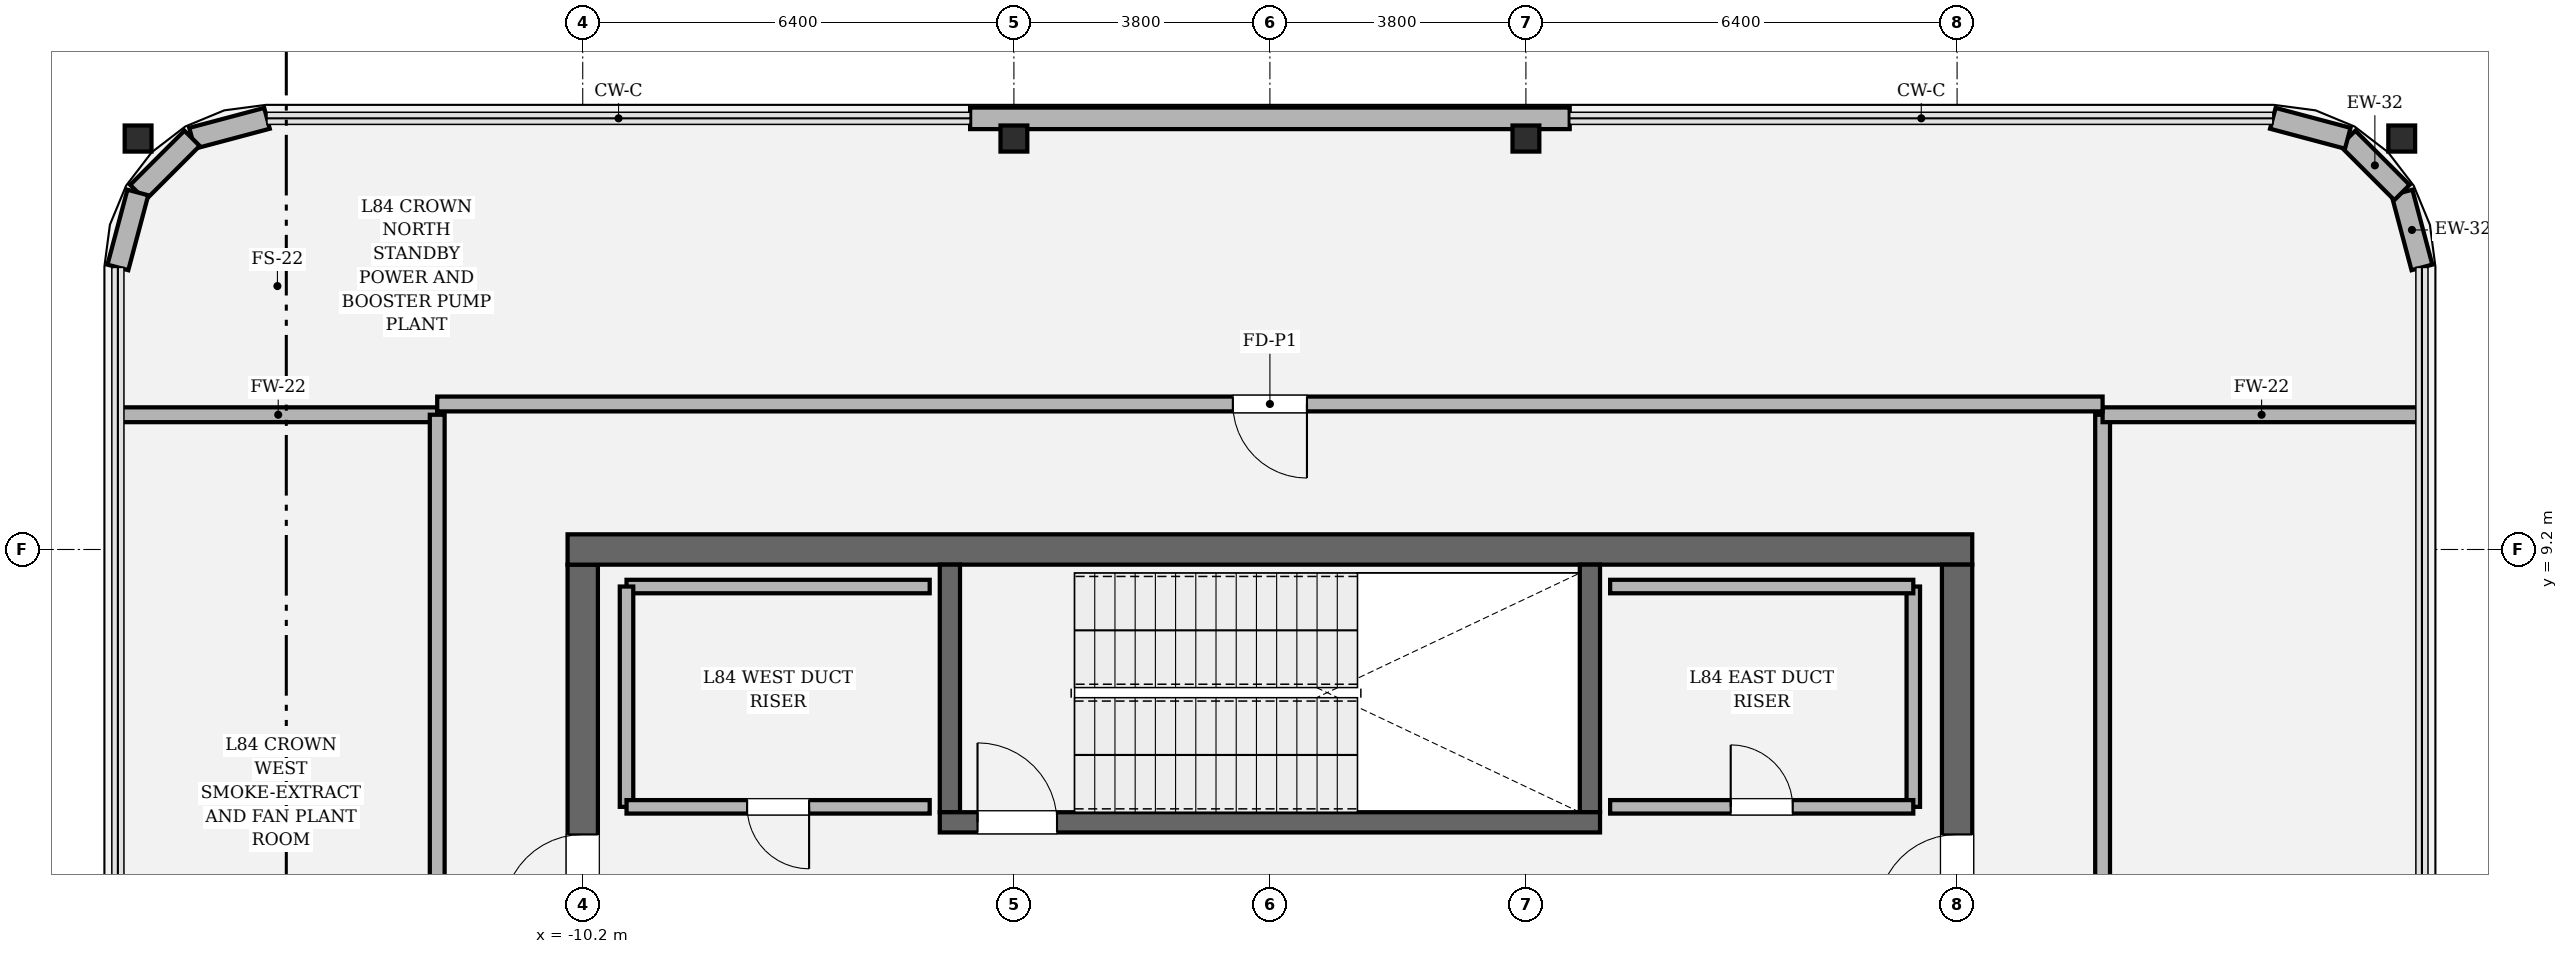
"""IFC4 building model, lengths in metres.
Left out: names, types, materials, properties, quantities, classifications, styles, units other than length and angle.
Written with IfcOpenShell. Run it as: python <this file> out.ifc"""

import sys

from ifc_helpers import new_model, si_unit, direction, frame, frame_2d, origin, origin_2d, place, context, subcontext, project, spatial, rectangle, i_section, extrude, element, fill, save


model = new_model("IFC4")
c1 = context("Model", 3, precision=1e-05, world=origin(), true_north=direction((0.0, 1.0)))
c2 = subcontext(c1, "Body", "Model", "MODEL_VIEW")
j1 = project(units=[si_unit("LENGTHUNIT", "METRE"), si_unit("PLANEANGLEUNIT", "RADIAN")], contexts=[c1])
p1 = place(None, origin())
s1 = spatial("IfcSite", under=j1, at=p1, CompositionType="ELEMENT")
p2 = place(p1, origin())
s2 = spatial("IfcBuilding", under=s1, at=p2, CompositionType="ELEMENT")
p3 = place(p2, frame((0.0, 0.0, 357.3)))
s3 = spatial("IfcBuildingStorey", under=s2, at=p3, CompositionType="ELEMENT", Elevation=357.3)
p4 = place(p3, frame((-10.2, -8.975, 0.0), z_axis=(0.0, 0.0, 1.0), x_axis=(0.0, 1.0, 0.0)))
e1 = element("IfcWall", 1, at=p4, inside=s3, PredefinedType="SHEAR", context=c2, shape_type="SweptSolid", body=[
    extrude(rectangle(XDim=17.95, YDim=0.45, at=frame_2d((8.975, 0.0))), origin(), (0.0, 0.0, 1.0), 4.5),
])
p5 = place(p4, frame((12.765, 0.0, 0.0)))
e2 = element("IfcOpeningElement", 2, at=p5, cuts=e1, PredefinedType="OPENING", context=c2, shape_type="SweptSolid", body=[
    extrude(rectangle(XDim=1.18, YDim=2.2, at=frame_2d((0.59, 1.1))), frame((0.0, 0.235, 0.0), z_axis=(0.0, -1.0, 0.0), x_axis=(1.0, 0.0, 0.0)), (0.0, 0.0, 1.0), 0.47),
])
p6 = place(p3, frame((-10.425, 9.2, 0.0), z_axis=(0.0, 0.0, 1.0), x_axis=(1.0, 0.0, 0.0)))
e3 = element("IfcWall", 3, at=p6, inside=s3, PredefinedType="SHEAR", context=c2, shape_type="SweptSolid", body=[
    extrude(rectangle(XDim=20.85, YDim=0.45, at=frame_2d((10.425, 0.0))), origin(), (0.0, 0.0, 1.0), 4.5),
])
p7 = place(p3, frame((10.2, 8.975, 0.0), z_axis=(0.0, 0.0, 1.0), x_axis=(0.0, -1.0, 0.0)))
e4 = element("IfcWall", 4, at=p7, inside=s3, PredefinedType="SHEAR", context=c2, shape_type="SweptSolid", body=[
    extrude(rectangle(XDim=17.95, YDim=0.45, at=frame_2d((8.975, 0.0))), origin(), (0.0, 0.0, 1.0), 4.5),
])
p8 = place(p7, frame((4.005, 0.0, 0.0)))
e5 = element("IfcOpeningElement", 5, at=p8, cuts=e4, PredefinedType="OPENING", context=c2, shape_type="SweptSolid", body=[
    extrude(rectangle(XDim=1.18, YDim=2.2, at=frame_2d((0.59, 1.1))), frame((0.0, 0.235, 0.0), z_axis=(0.0, -1.0, 0.0), x_axis=(1.0, 0.0, 0.0)), (0.0, 0.0, 1.0), 0.47),
])
for number, where, z_axis, x_axis in (
    (6, (-4.75, 5.3, 0.0), (0.0, 0.0, 1.0), (0.0, 1.0, 0.0)),
    (7, (4.75, 8.975, 0.0), (0.0, 0.0, 1.0), (0.0, -1.0, 0.0)),
):
    element("IfcWall", number, at=place(p3, frame(where, z_axis=z_axis, x_axis=x_axis)), inside=s3, PredefinedType="SOLIDWALL", context=c2, shape_type="SweptSolid", body=[
        extrude(rectangle(XDim=3.675, YDim=0.3, at=frame_2d((1.837, 0.0))), origin(), (0.0, 0.0, 1.0), 4.5),
    ])
p9 = place(p3, frame((-4.9, 5.15, 0.0), z_axis=(0.0, 0.0, 1.0), x_axis=(1.0, 0.0, 0.0)))
e8 = element("IfcWall", 8, at=p9, inside=s3, PredefinedType="SOLIDWALL", context=c2, shape_type="SweptSolid", body=[
    extrude(rectangle(XDim=9.8, YDim=0.3, at=frame_2d((4.9, 0.0))), origin(), (0.0, 0.0, 1.0), 4.5),
])
p10 = place(p9, frame((0.56, 0.0, 0.0)))
e9 = element("IfcOpeningElement", 9, at=p10, cuts=e8, PredefinedType="OPENING", context=c2, shape_type="SweptSolid", body=[
    extrude(rectangle(XDim=1.18, YDim=2.2, at=frame_2d((0.59, 1.1))), frame((0.0, 0.16, 0.0), z_axis=(0.0, -1.0, 0.0), x_axis=(1.0, 0.0, 0.0)), (0.0, 0.0, 1.0), 0.32),
])
for number, where, z_axis, x_axis in (
    (10, (-3.8, 15.3, 0.0), (0.0, 0.0, 1.0), (1.0, 0.0, 0.0)),
    (11, (3.8, 15.3, 0.0), (0.0, 0.0, 1.0), (1.0, 0.0, 0.0)),
    (12, (16.8, 15.3, 0.0), (0.0, 0.0, 1.0), (1.0, 0.0, 0.0)),
    (13, (-16.8, 15.3, 0.0), (0.0, 0.0, 1.0), (1.0, 0.0, 0.0)),
):
    element("IfcColumn", number, at=place(p3, frame(where, z_axis=z_axis, x_axis=x_axis)), inside=s3, PredefinedType="COLUMN", context=c2, shape_type="SweptSolid", body=[
        extrude(i_section(OverallWidth=0.398, OverallDepth=0.387, WebThickness=0.021, FlangeThickness=0.033, FilletRadius=0.018, at=origin_2d()), origin(), (0.0, 0.0, 1.0), 4.498),
    ])
p11 = place(p3, frame((17.1, 13.387, 0.0), z_axis=(0.0, 0.0, 1.0), x_axis=(-0.257530614576, 0.966270139534, 0.0)))
e14 = element("IfcWall", 14, at=p11, inside=s3, PredefinedType="SOLIDWALL", context=c2, shape_type="SweptSolid", body=[
    extrude(rectangle(XDim=1.151, YDim=0.32, at=frame_2d((0.575, 0.0))), origin(), (0.0, 0.0, 1.0), 3.894),
])
p12 = place(p3, frame((16.804, 14.499, 0.0), z_axis=(0.0, 0.0, 1.0), x_axis=(-0.707106781187, 0.707106781187, 0.0)))
e15 = element("IfcWall", 15, at=p12, inside=s3, PredefinedType="SOLIDWALL", context=c2, shape_type="SweptSolid", body=[
    extrude(rectangle(XDim=1.138, YDim=0.32, at=frame_2d((0.569, 0.0))), origin(), (0.0, 0.0, 1.0), 2.934),
])
p13 = place(p3, frame((15.999, 15.304, 0.0), z_axis=(0.0, 0.0, 1.0), x_axis=(-0.966270139534, 0.257530614576, 0.0)))
e16 = element("IfcWall", 16, at=p13, inside=s3, PredefinedType="SOLIDWALL", context=c2, shape_type="SweptSolid", body=[
    extrude(rectangle(XDim=1.151, YDim=0.32, at=frame_2d((0.575, 0.0))), origin(), (0.0, 0.0, 1.0), 3.894),
])
p14 = place(p3, frame((4.45, 15.6, 0.0), z_axis=(0.0, 0.0, 1.0), x_axis=(-1.0, 0.0, 0.0)))
e17 = element("IfcWall", 17, at=p14, inside=s3, PredefinedType="SOLIDWALL", context=c2, shape_type="SweptSolid", body=[
    extrude(rectangle(XDim=8.9, YDim=0.32, at=frame_2d((4.45, 0.0))), origin(), (0.0, 0.0, 1.0), 3.894),
])
p15 = place(p3, frame((-14.887, 15.6, 0.0), z_axis=(0.0, 0.0, 1.0), x_axis=(-0.966270139534, -0.257530614576, 0.0)))
e18 = element("IfcWall", 18, at=p15, inside=s3, PredefinedType="SOLIDWALL", context=c2, shape_type="SweptSolid", body=[
    extrude(rectangle(XDim=1.151, YDim=0.32, at=frame_2d((0.575, 0.0))), origin(), (0.0, 0.0, 1.0), 3.894),
])
p16 = place(p3, frame((-15.999, 15.304, 0.0), z_axis=(0.0, 0.0, 1.0), x_axis=(-0.707106781187, -0.707106781187, 0.0)))
e19 = element("IfcWall", 19, at=p16, inside=s3, PredefinedType="SOLIDWALL", context=c2, shape_type="SweptSolid", body=[
    extrude(rectangle(XDim=1.138, YDim=0.32, at=frame_2d((0.569, 0.0))), origin(), (0.0, 0.0, 1.0), 2.934),
])
p17 = place(p3, frame((-16.804, 14.499, 0.0), z_axis=(0.0, 0.0, 1.0), x_axis=(-0.257530614576, -0.966270139534, 0.0)))
e20 = element("IfcWall", 20, at=p17, inside=s3, PredefinedType="SOLIDWALL", context=c2, shape_type="SweptSolid", body=[
    extrude(rectangle(XDim=1.151, YDim=0.32, at=frame_2d((0.575, 0.0))), origin(), (0.0, 0.0, 1.0), 3.894),
])
p18 = place(p3, frame((-5.05, 8.65, 0.0), z_axis=(0.0, 0.0, 1.0), x_axis=(-1.0, 0.0, 0.0)))
e21 = element("IfcWall", 21, at=p18, inside=s3, PredefinedType="SOLIDWALL", context=c2, shape_type="SweptSolid", body=[
    extrude(rectangle(XDim=4.5, YDim=0.2, at=frame_2d((2.25, 0.0))), origin(), (0.0, 0.0, 1.0), 4.22),
])
p19 = place(p3, frame((-9.55, 8.65, 0.0), z_axis=(0.0, 0.0, 1.0), x_axis=(0.0, -1.0, 0.0)))
e22 = element("IfcWall", 22, at=p19, inside=s3, PredefinedType="SOLIDWALL", context=c2, shape_type="SweptSolid", body=[
    extrude(rectangle(XDim=3.27, YDim=0.2, at=frame_2d((1.635, 0.0))), origin(), (0.0, 0.0, 1.0), 4.22),
])
p20 = place(p3, frame((-9.55, 5.38, 0.0), z_axis=(0.0, 0.0, 1.0), x_axis=(1.0, 0.0, 0.0)))
e23 = element("IfcWall", 23, at=p20, inside=s3, PredefinedType="SOLIDWALL", context=c2, shape_type="SweptSolid", body=[
    extrude(rectangle(XDim=4.5, YDim=0.2, at=frame_2d((2.25, 0.0))), origin(), (0.0, 0.0, 1.0), 4.22),
])
p21 = place(p20, frame((1.79, 0.0, 0.0)))
e24 = element("IfcOpeningElement", 24, at=p21, cuts=e23, PredefinedType="OPENING", context=c2, shape_type="SweptSolid", body=[
    extrude(rectangle(XDim=0.92, YDim=2.1, at=frame_2d((0.46, 1.05))), frame((0.0, 0.11, 0.0), z_axis=(0.0, -1.0, 0.0), x_axis=(1.0, 0.0, 0.0)), (0.0, 0.0, 1.0), 0.22),
])
p22 = place(p3, frame((9.55, 5.38, 0.0), z_axis=(0.0, 0.0, 1.0), x_axis=(0.0, 1.0, 0.0)))
e25 = element("IfcWall", 25, at=p22, inside=s3, PredefinedType="SOLIDWALL", context=c2, shape_type="SweptSolid", body=[
    extrude(rectangle(XDim=3.27, YDim=0.2, at=frame_2d((1.635, 0.0))), origin(), (0.0, 0.0, 1.0), 4.22),
])
p23 = place(p3, frame((9.55, 8.65, 0.0), z_axis=(0.0, 0.0, 1.0), x_axis=(-1.0, 0.0, 0.0)))
e26 = element("IfcWall", 26, at=p23, inside=s3, PredefinedType="SOLIDWALL", context=c2, shape_type="SweptSolid", body=[
    extrude(rectangle(XDim=4.5, YDim=0.2, at=frame_2d((2.25, 0.0))), origin(), (0.0, 0.0, 1.0), 4.22),
])
p24 = place(p3, frame((5.05, 5.38, 0.0), z_axis=(0.0, 0.0, 1.0), x_axis=(1.0, 0.0, 0.0)))
e27 = element("IfcWall", 27, at=p24, inside=s3, PredefinedType="SOLIDWALL", context=c2, shape_type="SweptSolid", body=[
    extrude(rectangle(XDim=4.5, YDim=0.2, at=frame_2d((2.25, 0.0))), origin(), (0.0, 0.0, 1.0), 4.22),
])
p25 = place(p24, frame((1.79, 0.0, 0.0)))
e28 = element("IfcOpeningElement", 28, at=p25, cuts=e27, PredefinedType="OPENING", context=c2, shape_type="SweptSolid", body=[
    extrude(rectangle(XDim=0.92, YDim=2.1, at=frame_2d((0.46, 1.05))), frame((0.0, 0.11, 0.0), z_axis=(0.0, -1.0, 0.0), x_axis=(1.0, 0.0, 0.0)), (0.0, 0.0, 1.0), 0.22),
])
p26 = place(p3, frame((-17.08, 11.2, 0.0), z_axis=(0.0, 0.0, 1.0), x_axis=(1.0, 0.0, 0.0)))
e29 = element("IfcWall", 29, at=p26, inside=s3, PredefinedType="SOLIDWALL", context=c2, shape_type="SweptSolid", body=[
    extrude(rectangle(XDim=4.72, YDim=0.22, at=frame_2d((2.36, 0.0))), origin(), (0.0, 0.0, 1.0), 2.934),
])
p27 = place(p3, frame((-12.36, 11.2, 0.0), z_axis=(0.0, 0.0, 1.0), x_axis=(0.0, -1.0, 0.0)))
e30 = element("IfcWall", 30, at=p27, inside=s3, PredefinedType="SOLIDWALL", context=c2, shape_type="SweptSolid", body=[
    extrude(rectangle(XDim=22.4, YDim=0.22, at=frame_2d((11.2, 0.0))), origin(), (0.0, 0.0, 1.0), 2.934),
])
p28 = place(p27, frame((10.65, 0.0, 0.0)))
e31 = element("IfcOpeningElement", 31, at=p28, cuts=e30, PredefinedType="OPENING", context=c2, shape_type="SweptSolid", body=[
    extrude(rectangle(XDim=1.1, YDim=2.2, at=frame_2d((0.55, 1.1))), frame((0.0, 0.12, 0.0), z_axis=(0.0, -1.0, 0.0), x_axis=(1.0, 0.0, 0.0)), (0.0, 0.0, 1.0), 0.24),
])
p29 = place(p3, frame((12.36, -11.2, 0.0), z_axis=(0.0, 0.0, 1.0), x_axis=(0.0, 1.0, 0.0)))
e32 = element("IfcWall", 32, at=p29, inside=s3, PredefinedType="SOLIDWALL", context=c2, shape_type="SweptSolid", body=[
    extrude(rectangle(XDim=22.4, YDim=0.22, at=frame_2d((11.2, 0.0))), origin(), (0.0, 0.0, 1.0), 2.934),
])
p30 = place(p29, frame((10.65, 0.0, 0.0)))
e33 = element("IfcOpeningElement", 33, at=p30, cuts=e32, PredefinedType="OPENING", context=c2, shape_type="SweptSolid", body=[
    extrude(rectangle(XDim=1.1, YDim=2.2, at=frame_2d((0.55, 1.1))), frame((0.0, 0.12, 0.0), z_axis=(0.0, -1.0, 0.0), x_axis=(1.0, 0.0, 0.0)), (0.0, 0.0, 1.0), 0.24),
])
p31 = place(p3, frame((12.36, 11.2, 0.0), z_axis=(0.0, 0.0, 1.0), x_axis=(1.0, 0.0, 0.0)))
e34 = element("IfcWall", 34, at=p31, inside=s3, PredefinedType="SOLIDWALL", context=c2, shape_type="SweptSolid", body=[
    extrude(rectangle(XDim=4.72, YDim=0.22, at=frame_2d((2.36, 0.0))), origin(), (0.0, 0.0, 1.0), 2.934),
])
p32 = place(p3, frame((12.36, 11.36, 0.0), z_axis=(0.0, 0.0, 1.0), x_axis=(-1.0, 0.0, 0.0)))
e35 = element("IfcWall", 35, at=p32, inside=s3, PredefinedType="SOLIDWALL", context=c2, shape_type="SweptSolid", body=[
    extrude(rectangle(XDim=24.72, YDim=0.22, at=frame_2d((12.36, 0.0))), origin(), (0.0, 0.0, 1.0), 2.934),
])
p33 = place(p32, frame((11.81, 0.0, 0.0)))
e36 = element("IfcOpeningElement", 36, at=p33, cuts=e35, PredefinedType="OPENING", context=c2, shape_type="SweptSolid", body=[
    extrude(rectangle(XDim=1.1, YDim=2.2, at=frame_2d((0.55, 1.1))), frame((0.0, 0.12, 0.0), z_axis=(0.0, -1.0, 0.0), x_axis=(1.0, 0.0, 0.0)), (0.0, 0.0, 1.0), 0.24),
])
p34 = place(p10, origin())
e37 = element("IfcDoor", 37, at=p34, inside=s3, OperationType="SINGLE_SWING_LEFT", PredefinedType="DOOR", context=c2, shape_type="SweptSolid", body=[
    extrude(rectangle(XDim=1.18, YDim=2.2, at=frame_2d((0.59, 1.1))), frame((0.0, 0.025, 0.0), z_axis=(0.0, -1.0, 0.0), x_axis=(1.0, 0.0, 0.0)), (0.0, 0.0, 1.0), 0.05),
])
fill(e9, e37)
p35 = place(p5, origin())
e38 = element("IfcDoor", 38, at=p35, inside=s3, OperationType="SINGLE_SWING_LEFT", PredefinedType="DOOR", context=c2, shape_type="SweptSolid", body=[
    extrude(rectangle(XDim=1.18, YDim=2.2, at=frame_2d((0.59, 1.1))), frame((0.0, 0.025, 0.0), z_axis=(0.0, -1.0, 0.0), x_axis=(1.0, 0.0, 0.0)), (0.0, 0.0, 1.0), 0.05),
])
fill(e2, e38)
p36 = place(p8, origin())
e39 = element("IfcDoor", 39, at=p36, inside=s3, OperationType="SINGLE_SWING_RIGHT", PredefinedType="DOOR", context=c2, shape_type="SweptSolid", body=[
    extrude(rectangle(XDim=1.18, YDim=2.2, at=frame_2d((0.59, 1.1))), frame((0.0, 0.025, 0.0), z_axis=(0.0, -1.0, 0.0), x_axis=(1.0, 0.0, 0.0)), (0.0, 0.0, 1.0), 0.05),
])
fill(e5, e39)
p37 = place(p21, origin())
e40 = element("IfcDoor", 40, at=p37, inside=s3, OperationType="SINGLE_SWING_RIGHT", PredefinedType="DOOR", context=c2, shape_type="SweptSolid", body=[
    extrude(rectangle(XDim=0.92, YDim=2.1, at=frame_2d((0.46, 1.05))), frame((0.0, 0.025, 0.0), z_axis=(0.0, -1.0, 0.0), x_axis=(1.0, 0.0, 0.0)), (0.0, 0.0, 1.0), 0.05),
])
fill(e24, e40)
p38 = place(p25, origin())
e41 = element("IfcDoor", 41, at=p38, inside=s3, OperationType="SINGLE_SWING_LEFT", PredefinedType="DOOR", context=c2, shape_type="SweptSolid", body=[
    extrude(rectangle(XDim=0.92, YDim=2.1, at=frame_2d((0.46, 1.05))), frame((0.0, 0.025, 0.0), z_axis=(0.0, -1.0, 0.0), x_axis=(1.0, 0.0, 0.0)), (0.0, 0.0, 1.0), 0.05),
])
fill(e28, e41)
p39 = place(p33, origin())
e42 = element("IfcDoor", 42, at=p39, inside=s3, OperationType="SINGLE_SWING_LEFT", PredefinedType="DOOR", context=c2, shape_type="SweptSolid", body=[
    extrude(rectangle(XDim=1.1, YDim=2.2, at=frame_2d((0.55, 1.1))), frame((0.0, 0.025, 0.0), z_axis=(0.0, -1.0, 0.0), x_axis=(1.0, 0.0, 0.0)), (0.0, 0.0, 1.0), 0.05),
])
fill(e36, e42)
save(model, sys.argv[1])
